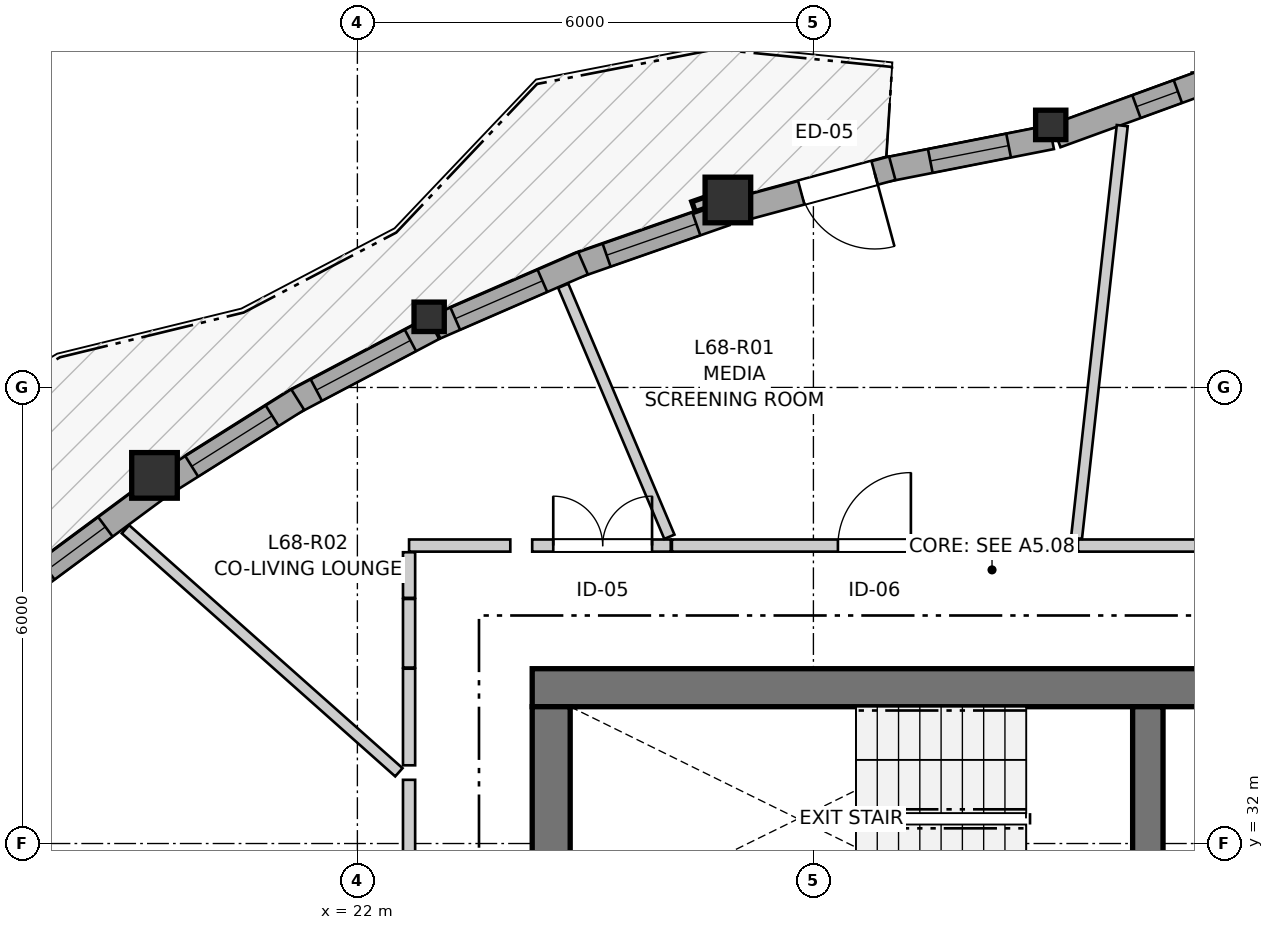
"""IFC4 building model, lengths in metres.
Left out: names, types, materials, properties, quantities, classifications, styles, units other than length and angle.
Written with IfcOpenShell. Run it as: python <this file> out.ifc"""

import sys

from ifc_helpers import new_model, si_unit, direction, frame, frame_2d, origin, origin_2d, place, context, subcontext, project, spatial, rectangle, i_section, extrude, source, transform, mapped, element, fill, save


model = new_model("IFC4")
c1 = context("Model", 3, precision=1e-05, world=origin(), true_north=direction((0.0, 1.0)))
c2 = subcontext(c1, "Body", "Model", "MODEL_VIEW")
j1 = project(units=[si_unit("LENGTHUNIT", "METRE"), si_unit("PLANEANGLEUNIT", "RADIAN")], contexts=[c1])
p1 = place(None, origin())
s1 = spatial("IfcSite", under=j1, at=p1, CompositionType="ELEMENT")
p2 = place(p1, origin())
s2 = spatial("IfcBuilding", under=s1, at=p2, CompositionType="ELEMENT")
p3 = place(p2, frame((0.0, 0.0, 227.6)))
s3 = spatial("IfcBuildingStorey", under=s2, at=p3, CompositionType="ELEMENT", Elevation=227.6)
p4 = place(p3, frame((36.4, 34.05, 0.0), z_axis=(0.0, 0.0, 1.0), x_axis=(-1.0, 0.0, 0.0)))
e1 = element("IfcWall", 1, at=p4, inside=s3, PredefinedType="SHEAR", context=c2, shape_type="SweptSolid", body=[
    extrude(rectangle(XDim=12.1, YDim=0.5, at=frame_2d((6.05, 0.0))), origin(), (0.0, 0.0, 1.0), 2.96),
])
p5 = place(p3, frame((24.55, 33.8, 0.0), z_axis=(0.0, 0.0, 1.0), x_axis=(0.0, -1.0, 0.0)))
e2 = element("IfcWall", 2, at=p5, inside=s3, PredefinedType="SHEAR", context=c2, shape_type="SweptSolid", body=[
    extrude(rectangle(XDim=15.6, YDim=0.5, at=frame_2d((7.8, 0.0))), origin(), (0.0, 0.0, 1.0), 2.96),
])
p6 = place(p5, frame((7.05, 0.0, 0.0)))
e3 = element("IfcOpeningElement", 3, at=p6, cuts=e2, PredefinedType="OPENING", context=c2, shape_type="SweptSolid", body=[
    extrude(rectangle(XDim=1.5, YDim=2.15, at=frame_2d((0.75, 1.075))), frame((0.0, 0.26, 0.0), z_axis=(0.0, -1.0, 0.0), x_axis=(1.0, 0.0, 0.0)), (0.0, 0.0, 1.0), 0.52),
])
p7 = place(p5, frame((3.52, 0.0, 0.0)))
e4 = element("IfcOpeningElement", 4, at=p7, cuts=e2, PredefinedType="OPENING", context=c2, shape_type="SweptSolid", body=[
    extrude(rectangle(XDim=0.86, YDim=2.05, at=frame_2d((0.43, 1.025))), frame((0.0, 0.26, 0.0), z_axis=(0.0, -1.0, 0.0), x_axis=(1.0, 0.0, 0.0)), (0.0, 0.0, 1.0), 0.52),
])
p8 = place(p5, frame((11.22, 0.0, 0.0)))
e5 = element("IfcOpeningElement", 5, at=p8, cuts=e2, PredefinedType="OPENING", context=c2, shape_type="SweptSolid", body=[
    extrude(rectangle(XDim=0.86, YDim=2.05, at=frame_2d((0.43, 1.025))), frame((0.0, 0.26, 0.0), z_axis=(0.0, -1.0, 0.0), x_axis=(1.0, 0.0, 0.0)), (0.0, 0.0, 1.0), 0.52),
])
p9 = place(p3, frame((32.4, 30.85, 0.0), z_axis=(0.0, 0.0, 1.0), x_axis=(0.0, 1.0, 0.0)))
e6 = element("IfcWall", 6, at=p9, inside=s3, PredefinedType="SHEAR", context=c2, shape_type="SweptSolid", body=[
    extrude(rectangle(XDim=2.95, YDim=0.4, at=frame_2d((1.475, 0.0))), origin(), (0.0, 0.0, 1.0), 2.96),
])
m1 = source(origin(), c2, "Body", "SweptSolid", [
    extrude(i_section(OverallWidth=0.398, OverallDepth=0.387, WebThickness=0.019, FlangeThickness=0.03, FilletRadius=0.015, at=origin_2d()), origin(), (0.0, 0.0, 1.0), 2.96),
])
p10 = place(p3, frame((31.123, 41.454, 0.0), z_axis=(0.0, 0.0, 1.0), x_axis=(1.0, 0.0, 0.0)))
e7 = element("IfcColumn", 7, at=p10, inside=s3, PredefinedType="PILASTER", context=c2, shape_type="MappedRepresentation", body=[
    mapped(m1, transform((0.0, 0.0, 0.0), x_axis=(1.0, 0.0, 0.0), y_axis=(0.0, 1.0, 0.0), z_axis=(0.0, 0.0, 1.0), scale=1.0)),
])
m2 = source(origin(), c2, "Body", "SweptSolid", [
    extrude(rectangle(XDim=0.6, YDim=0.6, at=origin_2d()), origin(), (0.0, 0.0, 1.0), 2.96),
])
p11 = place(p3, frame((26.875, 40.467, 0.0), z_axis=(0.0, 0.0, 1.0), x_axis=(1.0, 0.0, 0.0)))
e8 = element("IfcColumn", 8, at=p11, inside=s3, PredefinedType="COLUMN", context=c2, shape_type="MappedRepresentation", body=[
    mapped(m2, transform((0.0, 0.0, 0.0), x_axis=(1.0, 0.0, 0.0), y_axis=(0.0, 1.0, 0.0), z_axis=(0.0, 0.0, 1.0), scale=1.0)),
])
p12 = place(p3, frame((22.944, 38.929, 0.0), z_axis=(0.0, 0.0, 1.0), x_axis=(1.0, 0.0, 0.0)))
e9 = element("IfcColumn", 9, at=p12, inside=s3, PredefinedType="PILASTER", context=c2, shape_type="MappedRepresentation", body=[
    mapped(m1, transform((0.0, 0.0, 0.0), x_axis=(1.0, 0.0, 0.0), y_axis=(0.0, 1.0, 0.0), z_axis=(0.0, 0.0, 1.0), scale=1.0)),
])
p13 = place(p3, frame((19.331, 36.843, 0.0), z_axis=(0.0, 0.0, 1.0), x_axis=(1.0, 0.0, 0.0)))
e10 = element("IfcColumn", 10, at=p13, inside=s3, PredefinedType="COLUMN", context=c2, shape_type="MappedRepresentation", body=[
    mapped(m2, transform((0.0, 0.0, 0.0), x_axis=(1.0, 0.0, 0.0), y_axis=(0.0, 1.0, 0.0), z_axis=(0.0, 0.0, 1.0), scale=1.0)),
])
p14 = place(p3, frame((35.068, 41.983, 0.0), z_axis=(0.0, 0.0, 1.0), x_axis=(-1.0, 0.0, 0.0)))
e11 = element("IfcWall", 11, at=p14, inside=s3, PredefinedType="SOLIDWALL", context=c2, shape_type="SweptSolid", body=[
    extrude(rectangle(XDim=2.09, YDim=0.32, at=frame_2d((1.045, 0.0))), origin(), (0.0, 0.0, 1.0), 2.58),
])
p15 = place(p14, frame((0.37, 0.0, 0.82)))
e12 = element("IfcOpeningElement", 12, at=p15, cuts=e11, PredefinedType="OPENING", context=c2, shape_type="SweptSolid", body=[
    extrude(rectangle(XDim=1.35, YDim=1.45, at=frame_2d((0.675, 0.725))), frame((0.0, 0.17, 0.0), z_axis=(0.0, -1.0, 0.0), x_axis=(1.0, 0.0, 0.0)), (0.0, 0.0, 1.0), 0.34),
])
p16 = place(p3, frame((33.106, 42.006, 0.0), z_axis=(0.0, 0.0, 1.0), x_axis=(-0.939691662178, -0.342022777067, 0.0)))
e13 = element("IfcWall", 13, at=p16, inside=s3, PredefinedType="SOLIDWALL", context=c2, shape_type="SweptSolid", body=[
    extrude(rectangle(XDim=2.032, YDim=0.32, at=frame_2d((1.016, 0.0))), origin(), (0.0, 0.0, 1.0), 2.58),
])
p17 = place(p16, frame((0.33, 0.0, 0.82)))
e14 = element("IfcOpeningElement", 14, at=p17, cuts=e13, PredefinedType="OPENING", context=c2, shape_type="SweptSolid", body=[
    extrude(rectangle(XDim=0.58, YDim=1.35, at=frame_2d((0.29, 0.675))), frame((0.0, 0.17, 0.0), z_axis=(0.0, -1.0, 0.0), x_axis=(1.0, 0.0, 0.0)), (0.0, 0.0, 1.0), 0.34),
])
p18 = place(p3, frame((31.134, 41.293, 0.0), z_axis=(0.0, 0.0, 1.0), x_axis=(-0.981246594798, -0.19275663464, 0.0)))
e15 = element("IfcWall", 15, at=p18, inside=s3, PredefinedType="SOLIDWALL", context=c2, shape_type="SweptSolid", body=[
    extrude(rectangle(XDim=2.223, YDim=0.32, at=frame_2d((1.111, 0.0))), origin(), (0.0, 0.0, 1.0), 2.58),
])
p19 = place(p18, frame((0.576, 0.0, 0.82)))
e16 = element("IfcOpeningElement", 16, at=p19, cuts=e15, PredefinedType="OPENING", context=c2, shape_type="SweptSolid", body=[
    extrude(rectangle(XDim=1.05, YDim=1.45, at=frame_2d((0.525, 0.725))), frame((0.0, 0.17, 0.0), z_axis=(0.0, -1.0, 0.0), x_axis=(1.0, 0.0, 0.0)), (0.0, 0.0, 1.0), 0.34),
])
p20 = place(p3, frame((29.037, 40.885, 0.0), z_axis=(0.0, 0.0, 1.0), x_axis=(-0.965439872052, -0.260625887918, 0.0)))
e17 = element("IfcWall", 17, at=p20, inside=s3, PredefinedType="SOLIDWALL", context=c2, shape_type="SweptSolid", body=[
    extrude(rectangle(XDim=2.107, YDim=0.32, at=frame_2d((1.053, 0.0))), origin(), (0.0, 0.0, 1.0), 2.58),
])
p21 = place(p20, frame((0.24, 0.0, 0.0)))
e18 = element("IfcOpeningElement", 18, at=p21, cuts=e17, PredefinedType="OPENING", context=c2, shape_type="SweptSolid", body=[
    extrude(rectangle(XDim=1.0, YDim=2.1, at=frame_2d((0.5, 1.05))), frame((0.0, 0.17, 0.0), z_axis=(0.0, -1.0, 0.0), x_axis=(1.0, 0.0, 0.0)), (0.0, 0.0, 1.0), 0.34),
])
p22 = place(p3, frame((26.843, 40.286, 0.0), z_axis=(0.0, 0.0, 1.0), x_axis=(-0.944109796758, -0.329631144867, 0.0)))
e19 = element("IfcWall", 19, at=p22, inside=s3, PredefinedType="SOLIDWALL", context=c2, shape_type="SweptSolid", body=[
    extrude(rectangle(XDim=2.072, YDim=0.32, at=frame_2d((1.036, 0.0))), origin(), (0.0, 0.0, 1.0), 2.58),
])
p23 = place(p22, frame((0.406, 0.0, 0.82)))
e20 = element("IfcOpeningElement", 20, at=p23, cuts=e19, PredefinedType="OPENING", context=c2, shape_type="SweptSolid", body=[
    extrude(rectangle(XDim=1.25, YDim=1.35, at=frame_2d((0.625, 0.675))), frame((0.0, 0.17, 0.0), z_axis=(0.0, -1.0, 0.0), x_axis=(1.0, 0.0, 0.0)), (0.0, 0.0, 1.0), 0.34),
])
p24 = place(p3, frame((24.969, 39.635, 0.0), z_axis=(0.0, 0.0, 1.0), x_axis=(-0.917099379281, -0.398658661666, 0.0)))
e21 = element("IfcWall", 21, at=p24, inside=s3, PredefinedType="SOLIDWALL", context=c2, shape_type="SweptSolid", body=[
    extrude(rectangle(XDim=2.118, YDim=0.32, at=frame_2d((1.059, 0.0))), origin(), (0.0, 0.0, 1.0), 2.58),
])
p25 = place(p24, frame((0.582, 0.0, 0.82)))
e22 = element("IfcOpeningElement", 22, at=p25, cuts=e21, PredefinedType="OPENING", context=c2, shape_type="SweptSolid", body=[
    extrude(rectangle(XDim=1.25, YDim=1.35, at=frame_2d((0.625, 0.675))), frame((0.0, 0.17, 0.0), z_axis=(0.0, -1.0, 0.0), x_axis=(1.0, 0.0, 0.0)), (0.0, 0.0, 1.0), 0.34),
])
p26 = place(p3, frame((23.001, 38.779, 0.0), z_axis=(0.0, 0.0, 1.0), x_axis=(-0.884379435148, -0.466768695059, 0.0)))
e23 = element("IfcWall", 23, at=p26, inside=s3, PredefinedType="SOLIDWALL", context=c2, shape_type="SweptSolid", body=[
    extrude(rectangle(XDim=2.106, YDim=0.32, at=frame_2d((1.053, 0.0))), origin(), (0.0, 0.0, 1.0), 2.58),
])
p27 = place(p26, frame((0.343, 0.0, 0.82)))
e24 = element("IfcOpeningElement", 24, at=p27, cuts=e23, PredefinedType="OPENING", context=c2, shape_type="SweptSolid", body=[
    extrude(rectangle(XDim=1.4, YDim=1.35, at=frame_2d((0.7, 0.675))), frame((0.0, 0.17, 0.0), z_axis=(0.0, -1.0, 0.0), x_axis=(1.0, 0.0, 0.0)), (0.0, 0.0, 1.0), 0.34),
])
p28 = place(p3, frame((21.215, 37.84, 0.0), z_axis=(0.0, 0.0, 1.0), x_axis=(-0.846356989859, -0.532616039672, 0.0)))
e25 = element("IfcWall", 25, at=p28, inside=s3, PredefinedType="SOLIDWALL", context=c2, shape_type="SweptSolid", body=[
    extrude(rectangle(XDim=2.036, YDim=0.32, at=frame_2d((1.018, 0.0))), origin(), (0.0, 0.0, 1.0), 2.58),
])
p29 = place(p28, frame((0.398, 0.0, 0.82)))
e26 = element("IfcOpeningElement", 26, at=p29, cuts=e25, PredefinedType="OPENING", context=c2, shape_type="SweptSolid", body=[
    extrude(rectangle(XDim=1.25, YDim=1.35, at=frame_2d((0.625, 0.675))), frame((0.0, 0.17, 0.0), z_axis=(0.0, -1.0, 0.0), x_axis=(1.0, 0.0, 0.0)), (0.0, 0.0, 1.0), 0.34),
])
p30 = place(p3, frame((19.354, 36.661, 0.0), z_axis=(0.0, 0.0, 1.0), x_axis=(-0.803846460046, -0.59483684206, 0.0)))
e27 = element("IfcWall", 27, at=p30, inside=s3, PredefinedType="SOLIDWALL", context=c2, shape_type="SweptSolid", body=[
    extrude(rectangle(XDim=2.048, YDim=0.32, at=frame_2d((1.024, 0.0))), origin(), (0.0, 0.0, 1.0), 2.58),
])
p31 = place(p30, frame((0.832, 0.0, 0.82)))
e28 = element("IfcOpeningElement", 28, at=p31, cuts=e27, PredefinedType="OPENING", context=c2, shape_type="SweptSolid", body=[
    extrude(rectangle(XDim=0.95, YDim=1.35, at=frame_2d((0.475, 0.675))), frame((0.0, 0.17, 0.0), z_axis=(0.0, -1.0, 0.0), x_axis=(1.0, 0.0, 0.0)), (0.0, 0.0, 1.0), 0.34),
])
p32 = place(p3, frame((26.138, 35.92, 0.0), z_axis=(0.0, 0.0, 1.0), x_axis=(1.0, 0.0, 0.0)))
e29 = element("IfcWall", 29, at=p32, inside=s3, PredefinedType="PARTITIONING", context=c2, shape_type="SweptSolid", body=[
    extrude(rectangle(XDim=5.328, YDim=0.16, at=frame_2d((2.664, 0.0))), origin(), (0.0, 0.0, 1.0), 2.96),
])
p33 = place(p32, frame((2.185, 0.0, 0.0)))
e30 = element("IfcOpeningElement", 30, at=p33, cuts=e29, PredefinedType="OPENING", context=c2, shape_type="SweptSolid", body=[
    extrude(rectangle(XDim=0.96, YDim=2.1, at=frame_2d((0.48, 1.05))), frame((0.0, 0.09, 0.0), z_axis=(0.0, -1.0, 0.0), x_axis=(1.0, 0.0, 0.0)), (0.0, 0.0, 1.0), 0.18),
])
p34 = place(p3, frame((22.68, 27.85, 0.0), z_axis=(0.0, 0.0, 1.0), x_axis=(0.0, 1.0, 0.0)))
e31 = element("IfcWall", 31, at=p34, inside=s3, PredefinedType="PARTITIONING", context=c2, shape_type="SweptSolid", body=[
    extrude(rectangle(XDim=4.988, YDim=0.16, at=frame_2d((2.494, 0.0))), origin(), (0.0, 0.0, 1.0), 2.96),
])
p35 = place(p34, frame((2.033, 0.0, 0.0)))
e32 = element("IfcOpeningElement", 32, at=p35, cuts=e31, PredefinedType="OPENING", context=c2, shape_type="SweptSolid", body=[
    extrude(rectangle(XDim=0.96, YDim=2.1, at=frame_2d((0.48, 1.05))), frame((0.0, 0.09, 0.0), z_axis=(0.0, -1.0, 0.0), x_axis=(1.0, 0.0, 0.0)), (0.0, 0.0, 1.0), 0.18),
])
p36 = place(p3, frame((31.481, 35.92, 0.0), z_axis=(0.0, 0.0, 1.0), x_axis=(1.0, 0.0, 0.0)))
e33 = element("IfcWall", 33, at=p36, inside=s3, PredefinedType="PARTITIONING", context=c2, shape_type="SweptSolid", body=[
    extrude(rectangle(XDim=4.919, YDim=0.16, at=frame_2d((2.459, 0.0))), origin(), (0.0, 0.0, 1.0), 2.598),
])
p37 = place(p36, frame((1.965, 0.0, 0.0)))
e34 = element("IfcOpeningElement", 34, at=p37, cuts=e33, PredefinedType="OPENING", context=c2, shape_type="SweptSolid", body=[
    extrude(rectangle(XDim=0.96, YDim=2.1, at=frame_2d((0.48, 1.05))), frame((0.0, 0.09, 0.0), z_axis=(0.0, -1.0, 0.0), x_axis=(1.0, 0.0, 0.0)), (0.0, 0.0, 1.0), 0.18),
])
p38 = place(p3, frame((24.3, 35.92, 0.0), z_axis=(0.0, 0.0, 1.0), x_axis=(1.0, 0.0, 0.0)))
e35 = element("IfcWall", 35, at=p38, inside=s3, PredefinedType="PARTITIONING", context=c2, shape_type="SweptSolid", body=[
    extrude(rectangle(XDim=1.823, YDim=0.16, at=frame_2d((0.912, 0.0))), origin(), (0.0, 0.0, 1.0), 2.96),
])
p39 = place(p38, frame((0.277, 0.0, 0.0)))
e36 = element("IfcOpeningElement", 36, at=p39, cuts=e35, PredefinedType="OPENING", context=c2, shape_type="SweptSolid", body=[
    extrude(rectangle(XDim=1.3, YDim=2.1, at=frame_2d((0.65, 1.05))), frame((0.0, 0.09, 0.0), z_axis=(0.0, -1.0, 0.0), x_axis=(1.0, 0.0, 0.0)), (0.0, 0.0, 1.0), 0.18),
])
p40 = place(p3, frame((31.462, 36.016, 0.0), z_axis=(0.0, 0.0, 1.0), x_axis=(0.11018132109, 0.993911503346, 0.0)))
e37 = element("IfcWall", 37, at=p40, inside=s3, PredefinedType="PARTITIONING", context=c2, shape_type="SweptSolid", body=[
    extrude(rectangle(XDim=5.462, YDim=0.145, at=frame_2d((2.731, 0.0))), origin(), (0.0, 0.0, 1.0), 2.96),
])
p41 = place(p3, frame((18.949, 36.134, 0.0), z_axis=(0.0, 0.0, 1.0), x_axis=(0.747482088067, -0.664281964243, 0.0)))
e38 = element("IfcWall", 38, at=p41, inside=s3, PredefinedType="PARTITIONING", context=c2, shape_type="SweptSolid", body=[
    extrude(rectangle(XDim=4.812, YDim=0.145, at=frame_2d((2.406, 0.0))), origin(), (0.0, 0.0, 1.0), 2.96),
])
p42 = place(p3, frame((24.708, 39.338, 0.0), z_axis=(0.0, 0.0, 1.0), x_axis=(0.389551136954, -0.921004838043, 0.0)))
e39 = element("IfcWall", 39, at=p42, inside=s3, PredefinedType="PARTITIONING", context=c2, shape_type="SweptSolid", body=[
    extrude(rectangle(XDim=3.585, YDim=0.145, at=frame_2d((1.793, 0.0))), origin(), (0.0, 0.0, 1.0), 2.96),
])
p43 = place(p3, frame((22.68, 33.029, 0.0), z_axis=(0.0, 0.0, 1.0), x_axis=(0.0, 1.0, 0.0)))
e40 = element("IfcWall", 40, at=p43, inside=s3, PredefinedType="PARTITIONING", context=c2, shape_type="SweptSolid", body=[
    extrude(rectangle(XDim=1.271, YDim=0.16, at=frame_2d((0.635, 0.0))), origin(), (0.0, 0.0, 1.0), 2.628),
])
p44 = place(p3, frame((22.68, 35.92, 0.0), z_axis=(0.0, 0.0, 1.0), x_axis=(1.0, 0.0, 0.0)))
e41 = element("IfcWall", 41, at=p44, inside=s3, PredefinedType="PARTITIONING", context=c2, shape_type="SweptSolid", body=[
    extrude(rectangle(XDim=1.332, YDim=0.16, at=frame_2d((0.666, 0.0))), origin(), (0.0, 0.0, 1.0), 2.96),
])
p45 = place(p3, frame((22.68, 34.315, 0.0), z_axis=(0.0, 0.0, 1.0), x_axis=(0.0, 1.0, 0.0)))
e42 = element("IfcWall", 42, at=p45, inside=s3, PredefinedType="PARTITIONING", context=c2, shape_type="SweptSolid", body=[
    extrude(rectangle(XDim=0.902, YDim=0.16, at=frame_2d((0.451, 0.0))), origin(), (0.0, 0.0, 1.0), 2.96),
])
p46 = place(p3, frame((22.68, 35.232, 0.0), z_axis=(0.0, 0.0, 1.0), x_axis=(0.0, 1.0, 0.0)))
e43 = element("IfcWall", 43, at=p46, inside=s3, PredefinedType="PARTITIONING", context=c2, shape_type="SweptSolid", body=[
    extrude(rectangle(XDim=0.6, YDim=0.16, at=frame_2d((0.3, 0.0))), origin(), (0.0, 0.0, 1.0), 2.96),
])
m3 = source(origin(), c2, "Body", "SweptSolid", [
    extrude(rectangle(XDim=0.58, YDim=1.35, at=frame_2d((0.29, 0.675))), frame((0.0, 0.03, 0.0), z_axis=(0.0, -1.0, 0.0), x_axis=(1.0, 0.0, 0.0)), (0.0, 0.0, 1.0), 0.06),
])
p47 = place(p17, origin())
e44 = element("IfcWindow", 44, at=p47, inside=s3, PartitioningType="SINGLE_PANEL", PredefinedType="WINDOW", context=c2, shape_type="MappedRepresentation", body=[
    mapped(m3, transform((0.0, 0.0, 0.0), x_axis=(1.0, 0.0, 0.0), y_axis=(0.0, 1.0, 0.0), z_axis=(0.0, 0.0, 1.0), scale=1.0)),
])
fill(e14, e44)
m4 = source(origin(), c2, "Body", "SweptSolid", [
    extrude(rectangle(XDim=1.05, YDim=1.45, at=frame_2d((0.525, 0.725))), frame((0.0, 0.03, 0.0), z_axis=(0.0, -1.0, 0.0), x_axis=(1.0, 0.0, 0.0)), (0.0, 0.0, 1.0), 0.06),
])
p48 = place(p19, origin())
e45 = element("IfcWindow", 45, at=p48, inside=s3, PartitioningType="SINGLE_PANEL", PredefinedType="WINDOW", context=c2, shape_type="MappedRepresentation", body=[
    mapped(m4, transform((0.0, 0.0, 0.0), x_axis=(1.0, 0.0, 0.0), y_axis=(0.0, 1.0, 0.0), z_axis=(0.0, 0.0, 1.0), scale=1.0)),
])
fill(e16, e45)
m5 = source(origin(), c2, "Body", "SweptSolid", [
    extrude(rectangle(XDim=1.25, YDim=1.35, at=frame_2d((0.625, 0.675))), frame((0.0, 0.03, 0.0), z_axis=(0.0, -1.0, 0.0), x_axis=(1.0, 0.0, 0.0)), (0.0, 0.0, 1.0), 0.06),
])
p49 = place(p23, origin())
e46 = element("IfcWindow", 46, at=p49, inside=s3, PartitioningType="SINGLE_PANEL", PredefinedType="WINDOW", context=c2, shape_type="MappedRepresentation", body=[
    mapped(m5, transform((0.0, 0.0, 0.0), x_axis=(1.0, 0.0, 0.0), y_axis=(0.0, 1.0, 0.0), z_axis=(0.0, 0.0, 1.0), scale=1.0)),
])
fill(e20, e46)
p50 = place(p25, origin())
e47 = element("IfcWindow", 47, at=p50, inside=s3, PartitioningType="SINGLE_PANEL", PredefinedType="WINDOW", context=c2, shape_type="MappedRepresentation", body=[
    mapped(m5, transform((0.0, 0.0, 0.0), x_axis=(1.0, 0.0, 0.0), y_axis=(0.0, 1.0, 0.0), z_axis=(0.0, 0.0, 1.0), scale=1.0)),
])
fill(e22, e47)
m6 = source(origin(), c2, "Body", "SweptSolid", [
    extrude(rectangle(XDim=1.4, YDim=1.35, at=frame_2d((0.7, 0.675))), frame((0.0, 0.03, 0.0), z_axis=(0.0, -1.0, 0.0), x_axis=(1.0, 0.0, 0.0)), (0.0, 0.0, 1.0), 0.06),
])
p51 = place(p27, origin())
e48 = element("IfcWindow", 48, at=p51, inside=s3, PartitioningType="SINGLE_PANEL", PredefinedType="WINDOW", context=c2, shape_type="MappedRepresentation", body=[
    mapped(m6, transform((0.0, 0.0, 0.0), x_axis=(1.0, 0.0, 0.0), y_axis=(0.0, 1.0, 0.0), z_axis=(0.0, 0.0, 1.0), scale=1.0)),
])
fill(e24, e48)
p52 = place(p29, origin())
e49 = element("IfcWindow", 49, at=p52, inside=s3, PartitioningType="SINGLE_PANEL", PredefinedType="WINDOW", context=c2, shape_type="MappedRepresentation", body=[
    mapped(m5, transform((0.0, 0.0, 0.0), x_axis=(1.0, 0.0, 0.0), y_axis=(0.0, 1.0, 0.0), z_axis=(0.0, 0.0, 1.0), scale=1.0)),
])
fill(e26, e49)
m7 = source(origin(), c2, "Body", "SweptSolid", [
    extrude(rectangle(XDim=0.95, YDim=1.35, at=frame_2d((0.475, 0.675))), frame((0.0, 0.03, 0.0), z_axis=(0.0, -1.0, 0.0), x_axis=(1.0, 0.0, 0.0)), (0.0, 0.0, 1.0), 0.06),
])
p53 = place(p31, origin())
e50 = element("IfcWindow", 50, at=p53, inside=s3, PartitioningType="SINGLE_PANEL", PredefinedType="WINDOW", context=c2, shape_type="MappedRepresentation", body=[
    mapped(m7, transform((0.0, 0.0, 0.0), x_axis=(1.0, 0.0, 0.0), y_axis=(0.0, 1.0, 0.0), z_axis=(0.0, 0.0, 1.0), scale=1.0)),
])
fill(e28, e50)
m8 = source(origin(), c2, "Body", "SweptSolid", [
    extrude(rectangle(XDim=1.0, YDim=2.1, at=frame_2d((0.5, 1.05))), frame((0.0, 0.025, 0.0), z_axis=(0.0, -1.0, 0.0), x_axis=(1.0, 0.0, 0.0)), (0.0, 0.0, 1.0), 0.05),
])
p54 = place(p21, origin())
e51 = element("IfcDoor", 51, at=p54, inside=s3, OperationType="SINGLE_SWING_LEFT", PredefinedType="DOOR", context=c2, shape_type="MappedRepresentation", body=[
    mapped(m8, transform((0.0, 0.0, 0.0), x_axis=(1.0, 0.0, 0.0), y_axis=(0.0, 1.0, 0.0), z_axis=(0.0, 0.0, 1.0), scale=1.0)),
])
fill(e18, e51)
m9 = source(origin(), c2, "Body", "SweptSolid", [
    extrude(rectangle(XDim=0.96, YDim=2.1, at=frame_2d((0.48, 1.05))), frame((0.0, 0.025, 0.0), z_axis=(0.0, -1.0, 0.0), x_axis=(1.0, 0.0, 0.0)), (0.0, 0.0, 1.0), 0.05),
])
p55 = place(p33, origin())
e52 = element("IfcDoor", 52, at=p55, inside=s3, OperationType="SINGLE_SWING_RIGHT", PredefinedType="DOOR", context=c2, shape_type="MappedRepresentation", body=[
    mapped(m9, transform((0.0, 0.0, 0.0), x_axis=(1.0, 0.0, 0.0), y_axis=(0.0, 1.0, 0.0), z_axis=(0.0, 0.0, 1.0), scale=1.0)),
])
fill(e30, e52)
m10 = source(origin(), c2, "Body", "SweptSolid", [
    extrude(rectangle(XDim=1.3, YDim=2.1, at=frame_2d((0.65, 1.05))), frame((0.0, 0.025, 0.0), z_axis=(0.0, -1.0, 0.0), x_axis=(1.0, 0.0, 0.0)), (0.0, 0.0, 1.0), 0.05),
])
p56 = place(p39, origin())
e53 = element("IfcDoor", 53, at=p56, inside=s3, OperationType="DOUBLE_DOOR_SINGLE_SWING", PredefinedType="DOOR", context=c2, shape_type="MappedRepresentation", body=[
    mapped(m10, transform((0.0, 0.0, 0.0), x_axis=(1.0, 0.0, 0.0), y_axis=(0.0, 1.0, 0.0), z_axis=(0.0, 0.0, 1.0), scale=1.0)),
])
fill(e36, e53)
save(model, sys.argv[1])
